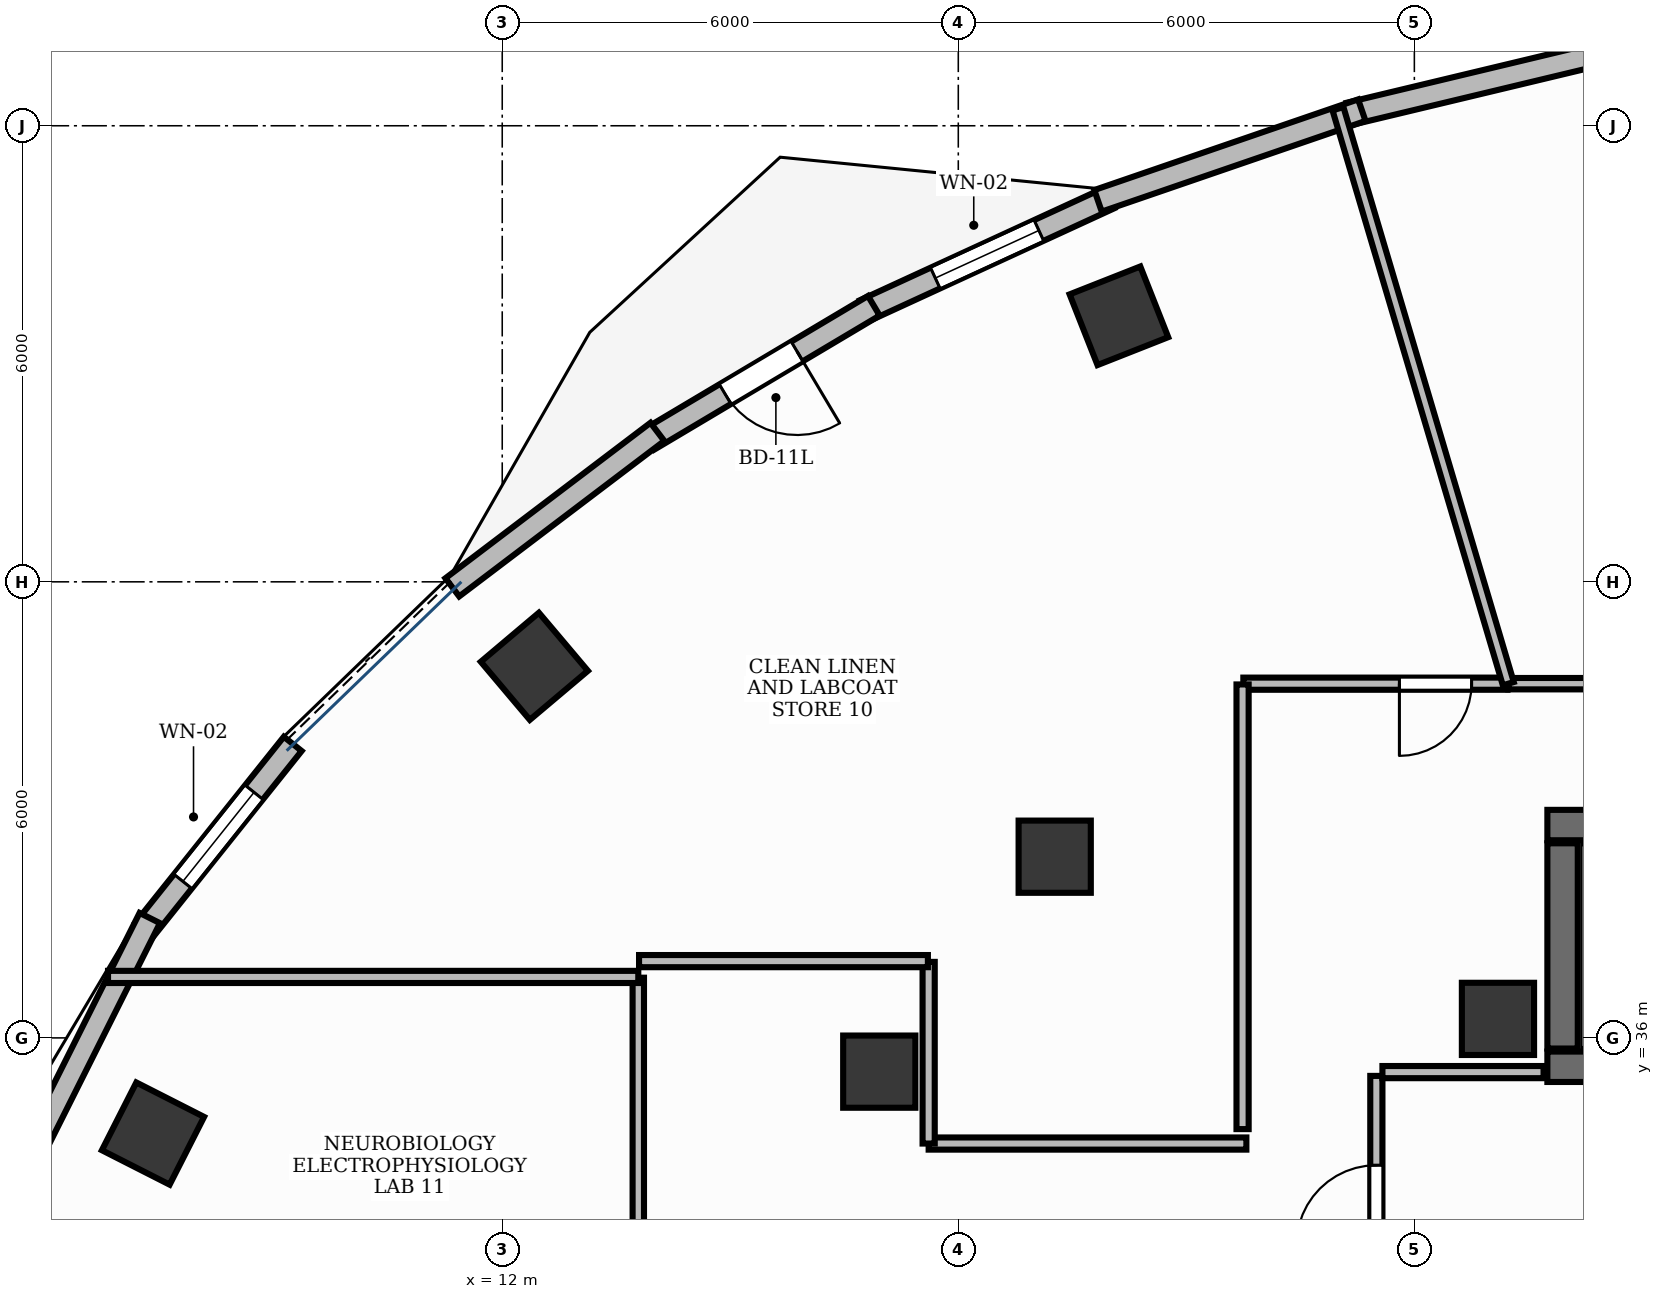
"""IFC4 building model, lengths in metres.
Left out: names, types, materials, properties, quantities, classifications, styles, units other than length and angle.
Written with IfcOpenShell. Run it as: python <this file> out.ifc"""

import sys

from ifc_helpers import new_model, si_unit, direction, frame, frame_2d, origin, origin_2d, place, context, subcontext, project, spatial, rectangle, extrude, element, fill, save


model = new_model("IFC4")
c1 = context("Model", 3, precision=1e-05, world=origin(), true_north=direction((0.0, 1.0)))
c2 = subcontext(c1, "Body", "Model", "MODEL_VIEW")
j1 = project(units=[si_unit("LENGTHUNIT", "METRE"), si_unit("PLANEANGLEUNIT", "RADIAN")], contexts=[c1])
p1 = place(None, origin())
s1 = spatial("IfcSite", under=j1, at=p1, CompositionType="ELEMENT")
p2 = place(p1, origin())
s2 = spatial("IfcBuilding", under=s1, at=p2, CompositionType="ELEMENT")
p3 = place(p2, frame((0.0, 0.0, 226.8)))
s3 = spatial("IfcBuildingStorey", under=s2, at=p3, CompositionType="ELEMENT", Elevation=226.8)
p4 = place(p3, frame((25.75, 38.8, 0.0), z_axis=(0.0, 0.0, 1.0), x_axis=(1.0, 0.0, 0.0)))
e1 = element("IfcWall", 1, at=p4, inside=s3, PredefinedType="SHEAR", context=c2, shape_type="SweptSolid", body=[
    extrude(rectangle(XDim=3.1, YDim=0.4, at=frame_2d((1.55, 0.0))), origin(), (0.0, 0.0, 1.0), 3.9),
])
p5 = place(p3, frame((25.75, 35.62, 0.0), z_axis=(0.0, 0.0, 1.0), x_axis=(1.0, 0.0, 0.0)))
e2 = element("IfcWall", 2, at=p5, inside=s3, PredefinedType="SHEAR", context=c2, shape_type="SweptSolid", body=[
    extrude(rectangle(XDim=3.1, YDim=0.4, at=frame_2d((1.55, 0.0))), origin(), (0.0, 0.0, 1.0), 3.9),
])
p6 = place(p5, frame((0.9, 0.0, 0.0)))
e3 = element("IfcOpeningElement", 3, at=p6, cuts=e2, PredefinedType="OPENING", context=c2, shape_type="SweptSolid", body=[
    extrude(rectangle(XDim=1.3, YDim=2.2, at=frame_2d((0.65, 1.1))), frame((0.0, 0.215, 0.0), z_axis=(0.0, -1.0, 0.0), x_axis=(1.0, 0.0, 0.0)), (0.0, 0.0, 1.0), 0.43),
])
p7 = place(p3, frame((25.95, 35.86, 0.0), z_axis=(0.0, 0.0, 1.0), x_axis=(0.0, 1.0, 0.0)))
e4 = element("IfcWall", 4, at=p7, inside=s3, PredefinedType="SHEAR", context=c2, shape_type="SweptSolid", body=[
    extrude(rectangle(XDim=2.7, YDim=0.4, at=frame_2d((1.35, 0.0))), origin(), (0.0, 0.0, 1.0), 3.9),
])
p8 = place(p3, frame((25.1, 36.25, -0.0), z_axis=(0.0, 0.0, 1.0), x_axis=(1.0, 0.0, 0.0)))
e5 = element("IfcColumn", 5, at=p8, inside=s3, PredefinedType="PILASTER", context=c2, shape_type="SweptSolid", body=[
    extrude(rectangle(XDim=0.95, YDim=0.95, at=origin_2d()), origin(), (0.0, 0.0, 1.0), 3.901),
])
for number, where, z_axis, x_axis in (
    (6, (20.113, 45.5, -0.0), (0.0, 0.0, 1.0), (0.93, 0.367, 0.0)),
    (7, (12.423, 40.889, -0.0), (0.0, 0.0, 1.0), (0.764, 0.645, 0.0)),
):
    element("IfcColumn", number, at=place(p3, frame(where, z_axis=z_axis, x_axis=x_axis)), inside=s3, PredefinedType="COLUMN", context=c2, shape_type="SweptSolid", body=[
        extrude(rectangle(XDim=1.0, YDim=1.0, at=origin_2d()), origin(), (0.0, 0.0, 1.0), 3.901),
    ])
p9 = place(p3, frame((19.268, 38.384, -0.0), z_axis=(0.0, 0.0, 1.0), x_axis=(1.0, 0.0, 0.0)))
e8 = element("IfcColumn", 8, at=p9, inside=s3, PredefinedType="COLUMN", context=c2, shape_type="SweptSolid", body=[
    extrude(rectangle(XDim=0.95, YDim=0.95, at=origin_2d()), origin(), (0.0, 0.0, 1.0), 3.901),
])
p10 = place(p3, frame((7.405, 34.741, -0.0), z_axis=(0.0, 0.0, 1.0), x_axis=(0.453057191132, 0.891481453292, 0.0)))
e9 = element("IfcColumn", 9, at=p10, inside=s3, PredefinedType="COLUMN", context=c2, shape_type="SweptSolid", body=[
    extrude(rectangle(XDim=1.0, YDim=1.0, at=origin_2d()), origin(), (0.0, 0.0, 1.0), 3.901),
])
p11 = place(p3, frame((16.96, 35.556, -0.0), z_axis=(0.0, 0.0, 1.0), x_axis=(1.0, 0.0, 0.0)))
e10 = element("IfcColumn", 10, at=p11, inside=s3, PredefinedType="COLUMN", context=c2, shape_type="SweptSolid", body=[
    extrude(rectangle(XDim=0.95, YDim=0.95, at=origin_2d()), origin(), (0.0, 0.0, 1.0), 3.901),
])
p12 = place(p3, frame((19.99, 47.051, 0.0), z_axis=(0.0, 0.0, 1.0), x_axis=(-0.908478431596, -0.41793174003, 0.0)))
e11 = element("IfcWall", 11, at=p12, inside=s3, PredefinedType="STANDARD", context=c2, shape_type="SweptSolid", body=[
    extrude(rectangle(XDim=3.547, YDim=0.3, at=frame_2d((1.773, 0.0))), origin(), (0.0, 0.0, 1.0), 3.9),
])
p13 = place(p12, frame((1.023, 0.0, 0.95)))
e12 = element("IfcOpeningElement", 12, at=p13, cuts=e11, PredefinedType="OPENING", context=c2, shape_type="SweptSolid", body=[
    extrude(rectangle(XDim=1.5, YDim=1.8, at=frame_2d((0.75, 0.9))), frame((0.0, 0.165, 0.0), z_axis=(0.0, -1.0, 0.0), x_axis=(1.0, 0.0, 0.0)), (0.0, 0.0, 1.0), 0.33),
])
p14 = place(p3, frame((16.889, 45.632, 0.0), z_axis=(0.0, 0.0, 1.0), x_axis=(-0.859459434124, -0.511203952543, 0.0)))
e13 = element("IfcWall", 13, at=p14, inside=s3, PredefinedType="STANDARD", context=c2, shape_type="SweptSolid", body=[
    extrude(rectangle(XDim=3.45, YDim=0.3, at=frame_2d((1.725, 0.0))), origin(), (0.0, 0.0, 1.0), 3.9),
])
p15 = place(p14, frame((1.175, 0.0, 0.0)))
e14 = element("IfcOpeningElement", 14, at=p15, cuts=e13, PredefinedType="OPENING", context=c2, shape_type="SweptSolid", body=[
    extrude(rectangle(XDim=1.1, YDim=2.15, at=frame_2d((0.55, 1.075))), frame((0.0, 0.165, 0.0), z_axis=(0.0, -1.0, 0.0), x_axis=(1.0, 0.0, 0.0)), (0.0, 0.0, 1.0), 0.33),
])
p16 = place(p3, frame((9.244, 39.868, 0.0), z_axis=(0.0, 0.0, 1.0), x_axis=(-0.624095877763, -0.781347768512, 0.0)))
e15 = element("IfcWall", 15, at=p16, inside=s3, PredefinedType="STANDARD", context=c2, shape_type="SweptSolid", body=[
    extrude(rectangle(XDim=3.132, YDim=0.3, at=frame_2d((1.566, 0.0))), origin(), (0.0, 0.0, 1.0), 3.9),
])
p17 = place(p16, frame((0.816, 0.0, 0.95)))
e16 = element("IfcOpeningElement", 16, at=p17, cuts=e15, PredefinedType="OPENING", context=c2, shape_type="SweptSolid", body=[
    extrude(rectangle(XDim=1.5, YDim=1.8, at=frame_2d((0.75, 0.9))), frame((0.0, 0.165, 0.0), z_axis=(0.0, -1.0, 0.0), x_axis=(1.0, 0.0, 0.0)), (0.0, 0.0, 1.0), 0.33),
])
p18 = place(p3, frame((26.775, 49.027, 0.0), z_axis=(0.0, 0.0, 1.0), x_axis=(-0.972475629939, -0.233004611918, 0.0)))
e17 = element("IfcWall", 17, at=p18, inside=s3, PredefinedType="STANDARD", context=c2, shape_type="SweptSolid", body=[
    extrude(rectangle(XDim=3.735, YDim=0.3, at=frame_2d((1.868, 0.0))), origin(), (0.0, 0.0, 1.0), 3.9),
])
p19 = place(p3, frame((23.309, 48.205, 0.0), z_axis=(0.0, 0.0, 1.0), x_axis=(-0.945722383555, -0.32497565023, 0.0)))
e18 = element("IfcWall", 18, at=p19, inside=s3, PredefinedType="STANDARD", context=c2, shape_type="SweptSolid", body=[
    extrude(rectangle(XDim=3.67, YDim=0.3, at=frame_2d((1.835, 0.0))), origin(), (0.0, 0.0, 1.0), 3.9),
])
p20 = place(p3, frame((14.041, 43.973, 0.0), z_axis=(0.0, 0.0, 1.0), x_axis=(-0.796917512891, -0.604088137317, 0.0)))
e19 = element("IfcWall", 19, at=p20, inside=s3, PredefinedType="STANDARD", context=c2, shape_type="SweptSolid", body=[
    extrude(rectangle(XDim=3.385, YDim=0.3, at=frame_2d((1.693, 0.0))), origin(), (0.0, 0.0, 1.0), 3.9),
])
p21 = place(p3, frame((7.363, 37.577, 0.0), z_axis=(0.0, 0.0, 1.0), x_axis=(-0.448240215972, -0.893913143871, 0.0)))
e20 = element("IfcWall", 20, at=p21, inside=s3, PredefinedType="STANDARD", context=c2, shape_type="SweptSolid", body=[
    extrude(rectangle(XDim=5.896, YDim=0.3, at=frame_2d((2.948, 0.0))), origin(), (0.0, 0.0, 1.0), 3.47),
])
p22 = place(p3, frame((23.5, 32.1, 0.0), z_axis=(0.0, 0.0, 1.0), x_axis=(0.0, 1.0, 0.0)))
e21 = element("IfcWall", 21, at=p22, inside=s3, PredefinedType="PARTITIONING", context=c2, shape_type="SweptSolid", body=[
    extrude(rectangle(XDim=3.4, YDim=0.16, at=frame_2d((1.7, 0.0))), origin(), (0.0, 0.0, 1.0), 2.91),
])
p23 = place(p22, frame((1.175, 0.0, 0.0)))
e22 = element("IfcOpeningElement", 22, at=p23, cuts=e21, PredefinedType="OPENING", context=c2, shape_type="SweptSolid", body=[
    extrude(rectangle(XDim=1.05, YDim=2.15, at=frame_2d((0.525, 1.075))), frame((0.0, 0.095, 0.0), z_axis=(0.0, -1.0, 0.0), x_axis=(1.0, 0.0, 0.0)), (0.0, 0.0, 1.0), 0.19),
])
p24 = place(p3, frame((23.58, 35.55, 0.0), z_axis=(0.0, 0.0, 1.0), x_axis=(1.0, 0.0, 0.0)))
e23 = element("IfcWall", 23, at=p24, inside=s3, PredefinedType="PARTITIONING", context=c2, shape_type="SweptSolid", body=[
    extrude(rectangle(XDim=2.12, YDim=0.16, at=frame_2d((1.06, 0.0))), origin(), (0.0, 0.0, 1.0), 2.91),
])
p25 = place(p3, frame((30.977, 40.66, 0.0), z_axis=(0.0, 0.0, 1.0), x_axis=(-1.0, 0.0, 0.0)))
e24 = element("IfcWall", 24, at=p25, inside=s3, PredefinedType="PARTITIONING", context=c2, shape_type="SweptSolid", body=[
    extrude(rectangle(XDim=5.741, YDim=0.15, at=frame_2d((2.871, 0.0))), origin(), (0.0, 0.0, 1.0), 2.91),
])
p26 = place(p25, frame((0.24, 0.0, 0.0)))
e25 = element("IfcOpeningElement", 25, at=p26, cuts=e24, PredefinedType="OPENING", context=c2, shape_type="SweptSolid", body=[
    extrude(rectangle(XDim=0.95, YDim=2.15, at=frame_2d((0.475, 1.075))), frame((0.0, 0.09, 0.0), z_axis=(0.0, -1.0, 0.0), x_axis=(1.0, 0.0, 0.0)), (0.0, 0.0, 1.0), 0.18),
])
p27 = place(p3, frame((25.226, 40.66, 0.0), z_axis=(0.0, 0.0, 1.0), x_axis=(-1.0, 0.0, 0.0)))
e26 = element("IfcWall", 26, at=p27, inside=s3, PredefinedType="PARTITIONING", context=c2, shape_type="SweptSolid", body=[
    extrude(rectangle(XDim=3.476, YDim=0.16, at=frame_2d((1.738, 0.0))), origin(), (0.0, 0.0, 1.0), 2.91),
])
p28 = place(p27, frame((0.472, 0.0, 0.0)))
e27 = element("IfcOpeningElement", 27, at=p28, cuts=e26, PredefinedType="OPENING", context=c2, shape_type="SweptSolid", body=[
    extrude(rectangle(XDim=0.95, YDim=2.15, at=frame_2d((0.475, 1.075))), frame((0.0, 0.095, 0.0), z_axis=(0.0, -1.0, 0.0), x_axis=(1.0, 0.0, 0.0)), (0.0, 0.0, 1.0), 0.19),
])
p29 = place(p3, frame((13.79, 36.792, 0.0), z_axis=(0.0, 0.0, 1.0), x_axis=(0.0, -1.0, 0.0)))
e28 = element("IfcWall", 28, at=p29, inside=s3, PredefinedType="PARTITIONING", context=c2, shape_type="SweptSolid", body=[
    extrude(rectangle(XDim=4.782, YDim=0.15, at=frame_2d((2.391, 0.0))), origin(), (0.0, 0.0, 1.0), 2.91),
])
p30 = place(p29, frame((3.312, 0.0, 0.0)))
e29 = element("IfcOpeningElement", 29, at=p30, cuts=e28, PredefinedType="OPENING", context=c2, shape_type="SweptSolid", body=[
    extrude(rectangle(XDim=0.95, YDim=2.15, at=frame_2d((0.475, 1.075))), frame((0.0, 0.09, 0.0), z_axis=(0.0, -1.0, 0.0), x_axis=(1.0, 0.0, 0.0)), (0.0, 0.0, 1.0), 0.18),
])
p31 = place(p3, frame((25.236, 40.66, 0.0), z_axis=(0.0, 0.0, 1.0), x_axis=(-0.284007193362, 0.958822149368, 0.0)))
e30 = element("IfcWall", 30, at=p31, inside=s3, PredefinedType="PARTITIONING", context=c2, shape_type="SweptSolid", body=[
    extrude(rectangle(XDim=7.889, YDim=0.15, at=frame_2d((3.944, 0.0))), origin(), (0.0, 0.0, 1.0), 2.91),
])
p32 = place(p3, frame((21.74, 40.65, 0.0), z_axis=(0.0, 0.0, 1.0), x_axis=(0.0, -1.0, 0.0)))
e31 = element("IfcWall", 31, at=p32, inside=s3, PredefinedType="PARTITIONING", context=c2, shape_type="SweptSolid", body=[
    extrude(rectangle(XDim=5.85, YDim=0.16, at=frame_2d((2.925, 0.0))), origin(), (0.0, 0.0, 1.0), 2.91),
])
p33 = place(p3, frame((21.79, 34.61, 0.0), z_axis=(0.0, 0.0, 1.0), x_axis=(-1.0, 0.0, 0.0)))
e32 = element("IfcWall", 32, at=p33, inside=s3, PredefinedType="PARTITIONING", context=c2, shape_type="SweptSolid", body=[
    extrude(rectangle(XDim=4.18, YDim=0.16, at=frame_2d((2.09, 0.0))), origin(), (0.0, 0.0, 1.0), 2.91),
])
p34 = place(p3, frame((17.61, 34.61, 0.0), z_axis=(0.0, 0.0, 1.0), x_axis=(0.0, 1.0, 0.0)))
e33 = element("IfcWall", 33, at=p34, inside=s3, PredefinedType="PARTITIONING", context=c2, shape_type="SweptSolid", body=[
    extrude(rectangle(XDim=2.39, YDim=0.16, at=frame_2d((1.195, 0.0))), origin(), (0.0, 0.0, 1.0), 2.91),
])
p35 = place(p3, frame((17.6, 37.01, 0.0), z_axis=(0.0, 0.0, 1.0), x_axis=(-1.0, 0.0, 0.0)))
e34 = element("IfcWall", 34, at=p35, inside=s3, PredefinedType="PARTITIONING", context=c2, shape_type="SweptSolid", body=[
    extrude(rectangle(XDim=3.8, YDim=0.16, at=frame_2d((1.9, 0.0))), origin(), (0.0, 0.0, 1.0), 2.91),
])
p36 = place(p3, frame((13.79, 36.802, 0.0), z_axis=(0.0, 0.0, 1.0), x_axis=(-1.0, 0.0, 0.0)))
e35 = element("IfcWall", 35, at=p36, inside=s3, PredefinedType="PARTITIONING", context=c2, shape_type="SweptSolid", body=[
    extrude(rectangle(XDim=6.976, YDim=0.16, at=frame_2d((3.488, 0.0))), origin(), (0.0, 0.0, 1.0), 2.91),
])
p37 = place(p13, origin())
e36 = element("IfcWindow", 36, at=p37, inside=s3, PartitioningType="DOUBLE_PANEL_VERTICAL", PredefinedType="WINDOW", context=c2, shape_type="SweptSolid", body=[
    extrude(rectangle(XDim=1.5, YDim=1.8, at=frame_2d((0.75, 0.9))), frame((0.0, 0.03, 0.0), z_axis=(0.0, -1.0, 0.0), x_axis=(1.0, 0.0, 0.0)), (0.0, 0.0, 1.0), 0.06),
])
fill(e12, e36)
p38 = place(p15, origin())
e37 = element("IfcDoor", 37, at=p38, inside=s3, OperationType="SINGLE_SWING_LEFT", PredefinedType="DOOR", context=c2, shape_type="SweptSolid", body=[
    extrude(rectangle(XDim=1.1, YDim=2.15, at=frame_2d((0.55, 1.075))), frame((0.0, 0.025, 0.0), z_axis=(0.0, -1.0, 0.0), x_axis=(1.0, 0.0, 0.0)), (0.0, 0.0, 1.0), 0.05),
])
fill(e14, e37)
p39 = place(p17, origin())
e38 = element("IfcWindow", 38, at=p39, inside=s3, PartitioningType="DOUBLE_PANEL_VERTICAL", PredefinedType="WINDOW", context=c2, shape_type="SweptSolid", body=[
    extrude(rectangle(XDim=1.5, YDim=1.8, at=frame_2d((0.75, 0.9))), frame((0.0, 0.03, 0.0), z_axis=(0.0, -1.0, 0.0), x_axis=(1.0, 0.0, 0.0)), (0.0, 0.0, 1.0), 0.06),
])
fill(e16, e38)
p40 = place(p23, origin())
e39 = element("IfcDoor", 39, at=p40, inside=s3, OperationType="SINGLE_SWING_LEFT", PredefinedType="DOOR", context=c2, shape_type="SweptSolid", body=[
    extrude(rectangle(XDim=1.05, YDim=2.15, at=frame_2d((0.525, 1.075))), frame((0.0, 0.025, 0.0), z_axis=(0.0, -1.0, 0.0), x_axis=(1.0, 0.0, 0.0)), (0.0, 0.0, 1.0), 0.05),
])
fill(e22, e39)
p41 = place(p28, origin())
e40 = element("IfcDoor", 40, at=p41, inside=s3, OperationType="SINGLE_SWING_RIGHT", PredefinedType="DOOR", context=c2, shape_type="SweptSolid", body=[
    extrude(rectangle(XDim=0.95, YDim=2.15, at=frame_2d((0.475, 1.075))), frame((0.0, 0.025, 0.0), z_axis=(0.0, -1.0, 0.0), x_axis=(1.0, 0.0, 0.0)), (0.0, 0.0, 1.0), 0.05),
])
fill(e27, e40)
save(model, sys.argv[1])
